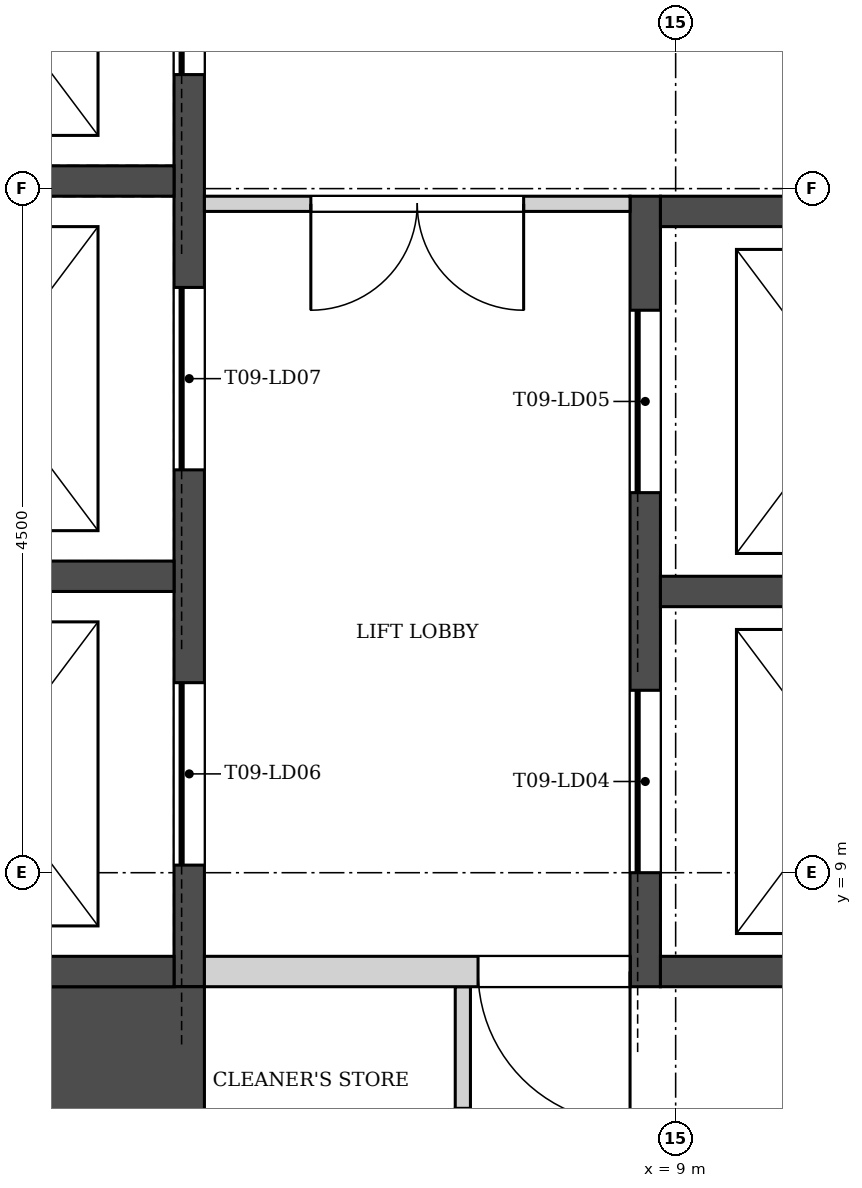
"""IFC4 building model, lengths in metres.
Left out: names, types, materials, properties, quantities, classifications, styles, units other than length and angle.
Written with IfcOpenShell. Run it as: python <this file> out.ifc"""

import sys

from ifc_helpers import new_model, si_unit, direction, frame, frame_2d, origin, place, context, subcontext, project, spatial, rectangle, extrude, element, fill, save


model = new_model("IFC4")
c1 = context("Model", 3, precision=1e-05, world=origin(), true_north=direction((0.0, 1.0)))
c2 = subcontext(c1, "Body", "Model", "MODEL_VIEW")
j1 = project(units=[si_unit("LENGTHUNIT", "METRE"), si_unit("PLANEANGLEUNIT", "RADIAN")], contexts=[c1])
p1 = place(None, origin())
s1 = spatial("IfcSite", under=j1, at=p1, CompositionType="ELEMENT")
p2 = place(p1, origin())
s2 = spatial("IfcBuilding", under=s1, at=p2, CompositionType="ELEMENT")
p3 = place(p2, frame((0.0, 0.0, 137.5)))
s3 = spatial("IfcBuildingStorey", under=s2, at=p3, CompositionType="ELEMENT", Elevation=137.5)
p4 = place(p3, frame((13.281, 10.699, 0.0), z_axis=(0.0, 0.0, 1.0), x_axis=(-0.499998513025, 0.866026262288, 0.0)))
e1 = element("IfcWall", 1, at=p4, inside=s3, PredefinedType="SHEAR", context=c2, shape_type="SweptSolid", body=[
    extrude(rectangle(XDim=9.008, YDim=1.2, at=frame_2d((4.504, 0.0))), origin(), (0.0, 0.0, 1.0), 5.4),
])
p5 = place(p3, frame((8.8, 8.25, -0.4), z_axis=(0.0, 0.0, 1.0), x_axis=(0.0, 1.0, 0.0)))
e2 = element("IfcWall", 2, at=p5, inside=s3, PredefinedType="SOLIDWALL", context=c2, shape_type="SweptSolid", body=[
    extrude(rectangle(XDim=5.2, YDim=0.2, at=frame_2d((2.6, 0.0))), origin(), (0.0, 0.0, 1.0), 5.4),
])
p6 = place(p5, frame((0.75, 0.0, 0.4)))
e3 = element("IfcOpeningElement", 3, at=p6, cuts=e2, PredefinedType="OPENING", context=c2, shape_type="SweptSolid", body=[
    extrude(rectangle(XDim=1.2, YDim=2.1, at=frame_2d((0.6, 1.05))), frame((0.0, 0.11, 0.0), z_axis=(0.0, -1.0, 0.0), x_axis=(1.0, 0.0, 0.0)), (0.0, 0.0, 1.0), 0.22),
])
p7 = place(p5, frame((3.25, 0.0, 0.4)))
e4 = element("IfcOpeningElement", 4, at=p7, cuts=e2, PredefinedType="OPENING", context=c2, shape_type="SweptSolid", body=[
    extrude(rectangle(XDim=1.2, YDim=2.1, at=frame_2d((0.6, 1.05))), frame((0.0, 0.11, 0.0), z_axis=(0.0, -1.0, 0.0), x_axis=(1.0, 0.0, 0.0)), (0.0, 0.0, 1.0), 0.22),
])
p8 = place(p3, frame((5.8, 8.25, -0.4), z_axis=(0.0, 0.0, 1.0), x_axis=(0.0, 1.0, 0.0)))
e5 = element("IfcWall", 5, at=p8, inside=s3, PredefinedType="SOLIDWALL", context=c2, shape_type="SweptSolid", body=[
    extrude(rectangle(XDim=8.0, YDim=0.2, at=frame_2d((4.0, 0.0))), origin(), (0.0, 0.0, 1.0), 5.4),
])
p9 = place(p8, frame((0.8, 0.0, 0.4)))
e6 = element("IfcOpeningElement", 6, at=p9, cuts=e5, PredefinedType="OPENING", context=c2, shape_type="SweptSolid", body=[
    extrude(rectangle(XDim=1.2, YDim=2.1, at=frame_2d((0.6, 1.05))), frame((0.0, 0.11, 0.0), z_axis=(0.0, -1.0, 0.0), x_axis=(1.0, 0.0, 0.0)), (0.0, 0.0, 1.0), 0.22),
])
p10 = place(p8, frame((3.4, 0.0, 0.4)))
e7 = element("IfcOpeningElement", 7, at=p10, cuts=e5, PredefinedType="OPENING", context=c2, shape_type="SweptSolid", body=[
    extrude(rectangle(XDim=1.2, YDim=2.1, at=frame_2d((0.6, 1.05))), frame((0.0, 0.11, 0.0), z_axis=(0.0, -1.0, 0.0), x_axis=(1.0, 0.0, 0.0)), (0.0, 0.0, 1.0), 0.22),
])
p11 = place(p8, frame((6.0, 0.0, 0.4)))
e8 = element("IfcOpeningElement", 8, at=p11, cuts=e5, PredefinedType="OPENING", context=c2, shape_type="SweptSolid", body=[
    extrude(rectangle(XDim=1.2, YDim=2.1, at=frame_2d((0.6, 1.05))), frame((0.0, 0.11, 0.0), z_axis=(0.0, -1.0, 0.0), x_axis=(1.0, 0.0, 0.0)), (0.0, 0.0, 1.0), 0.22),
])
p12 = place(p3, frame((5.2, 5.85, -0.4), z_axis=(0.0, 0.0, 1.0), x_axis=(0.0, 1.0, 0.0)))
e9 = element("IfcWall", 9, at=p12, inside=s3, PredefinedType="SOLIDWALL", context=c2, shape_type="SweptSolid", body=[
    extrude(rectangle(XDim=2.4, YDim=1.4, at=frame_2d((1.2, 0.0))), origin(), (0.0, 0.0, 1.0), 5.4),
])
p13 = place(p3, frame((8.9, 8.35, -0.4), z_axis=(0.0, 0.0, 1.0), x_axis=(1.0, 0.0, 0.0)))
e10 = element("IfcWall", 10, at=p13, inside=s3, PredefinedType="SOLIDWALL", context=c2, shape_type="SweptSolid", body=[
    extrude(rectangle(XDim=2.0, YDim=0.2, at=frame_2d((1.0, 0.0))), origin(), (0.0, 0.0, 1.0), 5.4),
])
p14 = place(p3, frame((1.5, 8.35, -0.4), z_axis=(0.0, 0.0, 1.0), x_axis=(1.0, 0.0, 0.0)))
e11 = element("IfcWall", 11, at=p14, inside=s3, PredefinedType="SOLIDWALL", context=c2, shape_type="SweptSolid", body=[
    extrude(rectangle(XDim=4.2, YDim=0.2, at=frame_2d((2.1, 0.0))), origin(), (0.0, 0.0, 1.0), 5.4),
])
for number, where, z_axis, x_axis in (
    (12, (8.9, 10.85, -0.4), (0.0, 0.0, 1.0), (1.0, 0.0, 0.0)),
    (13, (8.9, 13.35, -0.4), (0.0, 0.0, 1.0), (1.0, 0.0, 0.0)),
    (14, (3.7, 10.95, -0.4), (0.0, 0.0, 1.0), (1.0, 0.0, 0.0)),
    (15, (3.7, 13.55, -0.4), (0.0, 0.0, 1.0), (1.0, 0.0, 0.0)),
):
    element("IfcWall", number, at=place(p3, frame(where, z_axis=z_axis, x_axis=x_axis)), inside=s3, PredefinedType="SOLIDWALL", context=c2, shape_type="SweptSolid", body=[
        extrude(rectangle(XDim=2.0, YDim=0.2, at=frame_2d((1.0, 0.0))), origin(), (0.0, 0.0, 1.0), 5.4),
    ])
p15 = place(p3, frame((5.9, 13.4, 0.0), z_axis=(0.0, 0.0, 1.0), x_axis=(1.0, 0.0, 0.0)))
e16 = element("IfcWall", 16, at=p15, inside=s3, PredefinedType="PARTITIONING", context=c2, shape_type="SweptSolid", body=[
    extrude(rectangle(XDim=2.8, YDim=0.1, at=frame_2d((1.4, 0.0))), origin(), (0.0, 0.0, 1.0), 5.0),
])
p16 = place(p15, frame((0.7, 0.0, 0.0)))
e17 = element("IfcOpeningElement", 17, at=p16, cuts=e16, PredefinedType="OPENING", context=c2, shape_type="SweptSolid", body=[
    extrude(rectangle(XDim=1.4, YDim=2.1, at=frame_2d((0.7, 1.05))), frame((0.0, 0.06, 0.0), z_axis=(0.0, -1.0, 0.0), x_axis=(1.0, 0.0, 0.0)), (0.0, 0.0, 1.0), 0.12),
])
p17 = place(p3, frame((7.6, 5.85, 0.0), z_axis=(0.0, 0.0, 1.0), x_axis=(0.0, 1.0, 0.0)))
e18 = element("IfcWall", 18, at=p17, inside=s3, PredefinedType="PARTITIONING", context=c2, shape_type="SweptSolid", body=[
    extrude(rectangle(XDim=2.4, YDim=0.1, at=frame_2d((1.2, 0.0))), origin(), (0.0, 0.0, 1.0), 5.0),
])
p18 = place(p17, frame((0.7, 0.0, 0.0)))
e19 = element("IfcOpeningElement", 19, at=p18, cuts=e18, PredefinedType="OPENING", context=c2, shape_type="SweptSolid", body=[
    extrude(rectangle(XDim=0.9, YDim=2.1, at=frame_2d((0.45, 1.05))), frame((0.0, 0.06, 0.0), z_axis=(0.0, -1.0, 0.0), x_axis=(1.0, 0.0, 0.0)), (0.0, 0.0, 1.0), 0.12),
])
p19 = place(p3, frame((5.9, 8.35, 0.0), z_axis=(0.0, 0.0, 1.0), x_axis=(1.0, 0.0, 0.0)))
e20 = element("IfcWall", 20, at=p19, inside=s3, PredefinedType="SOLIDWALL", context=c2, shape_type="SweptSolid", body=[
    extrude(rectangle(XDim=2.8, YDim=0.2, at=frame_2d((1.4, 0.0))), origin(), (0.0, 0.0, 1.0), 5.0),
])
p20 = place(p19, frame((1.8, 0.0, 0.0)))
e21 = element("IfcOpeningElement", 21, at=p20, cuts=e20, PredefinedType="OPENING", context=c2, shape_type="SweptSolid", body=[
    extrude(rectangle(XDim=1.0, YDim=2.1, at=frame_2d((0.5, 1.05))), frame((0.0, 0.11, 0.0), z_axis=(0.0, -1.0, 0.0), x_axis=(1.0, 0.0, 0.0)), (0.0, 0.0, 1.0), 0.22),
])
p21 = place(p6, origin())
e22 = element("IfcDoor", 22, at=p21, inside=s3, OperationType="SLIDING_TO_LEFT", PredefinedType="DOOR", context=c2, shape_type="SweptSolid", body=[
    extrude(rectangle(XDim=1.2, YDim=2.1, at=frame_2d((0.6, 1.05))), frame((0.0, 0.025, 0.0), z_axis=(0.0, -1.0, 0.0), x_axis=(1.0, 0.0, 0.0)), (0.0, 0.0, 1.0), 0.05),
])
fill(e3, e22)
p22 = place(p7, origin())
e23 = element("IfcDoor", 23, at=p22, inside=s3, OperationType="SLIDING_TO_LEFT", PredefinedType="DOOR", context=c2, shape_type="SweptSolid", body=[
    extrude(rectangle(XDim=1.2, YDim=2.1, at=frame_2d((0.6, 1.05))), frame((0.0, 0.025, 0.0), z_axis=(0.0, -1.0, 0.0), x_axis=(1.0, 0.0, 0.0)), (0.0, 0.0, 1.0), 0.05),
])
fill(e4, e23)
p23 = place(p9, origin())
e24 = element("IfcDoor", 24, at=p23, inside=s3, OperationType="SLIDING_TO_LEFT", PredefinedType="DOOR", context=c2, shape_type="SweptSolid", body=[
    extrude(rectangle(XDim=1.2, YDim=2.1, at=frame_2d((0.6, 1.05))), frame((0.0, 0.025, 0.0), z_axis=(0.0, -1.0, 0.0), x_axis=(1.0, 0.0, 0.0)), (0.0, 0.0, 1.0), 0.05),
])
fill(e6, e24)
p24 = place(p10, origin())
e25 = element("IfcDoor", 25, at=p24, inside=s3, OperationType="SLIDING_TO_LEFT", PredefinedType="DOOR", context=c2, shape_type="SweptSolid", body=[
    extrude(rectangle(XDim=1.2, YDim=2.1, at=frame_2d((0.6, 1.05))), frame((0.0, 0.025, 0.0), z_axis=(0.0, -1.0, 0.0), x_axis=(1.0, 0.0, 0.0)), (0.0, 0.0, 1.0), 0.05),
])
fill(e7, e25)
p25 = place(p11, origin())
e26 = element("IfcDoor", 26, at=p25, inside=s3, OperationType="SLIDING_TO_LEFT", PredefinedType="DOOR", context=c2, shape_type="SweptSolid", body=[
    extrude(rectangle(XDim=1.2, YDim=2.1, at=frame_2d((0.6, 1.05))), frame((0.0, 0.025, 0.0), z_axis=(0.0, -1.0, 0.0), x_axis=(1.0, 0.0, 0.0)), (0.0, 0.0, 1.0), 0.05),
])
fill(e8, e26)
p26 = place(p16, frame((1.4, 0.0, 0.0), z_axis=(0.0, 0.0, 1.0), x_axis=(-1.0, 0.0, 0.0)))
e27 = element("IfcDoor", 27, at=p26, inside=s3, OperationType="DOUBLE_DOOR_SINGLE_SWING", PredefinedType="DOOR", context=c2, shape_type="SweptSolid", body=[
    extrude(rectangle(XDim=1.4, YDim=2.1, at=frame_2d((0.7, 1.05))), frame((0.0, 0.025, 0.0), z_axis=(0.0, -1.0, 0.0), x_axis=(1.0, 0.0, 0.0)), (0.0, 0.0, 1.0), 0.05),
])
fill(e17, e27)
p27 = place(p20, frame((1.0, 0.0, 0.0), z_axis=(0.0, 0.0, 1.0), x_axis=(-1.0, 0.0, 0.0)))
e28 = element("IfcDoor", 28, at=p27, inside=s3, OperationType="SINGLE_SWING_LEFT", PredefinedType="DOOR", context=c2, shape_type="SweptSolid", body=[
    extrude(rectangle(XDim=1.0, YDim=2.1, at=frame_2d((0.5, 1.05))), frame((0.0, 0.025, 0.0), z_axis=(0.0, -1.0, 0.0), x_axis=(1.0, 0.0, 0.0)), (0.0, 0.0, 1.0), 0.05),
])
fill(e21, e28)
save(model, sys.argv[1])
